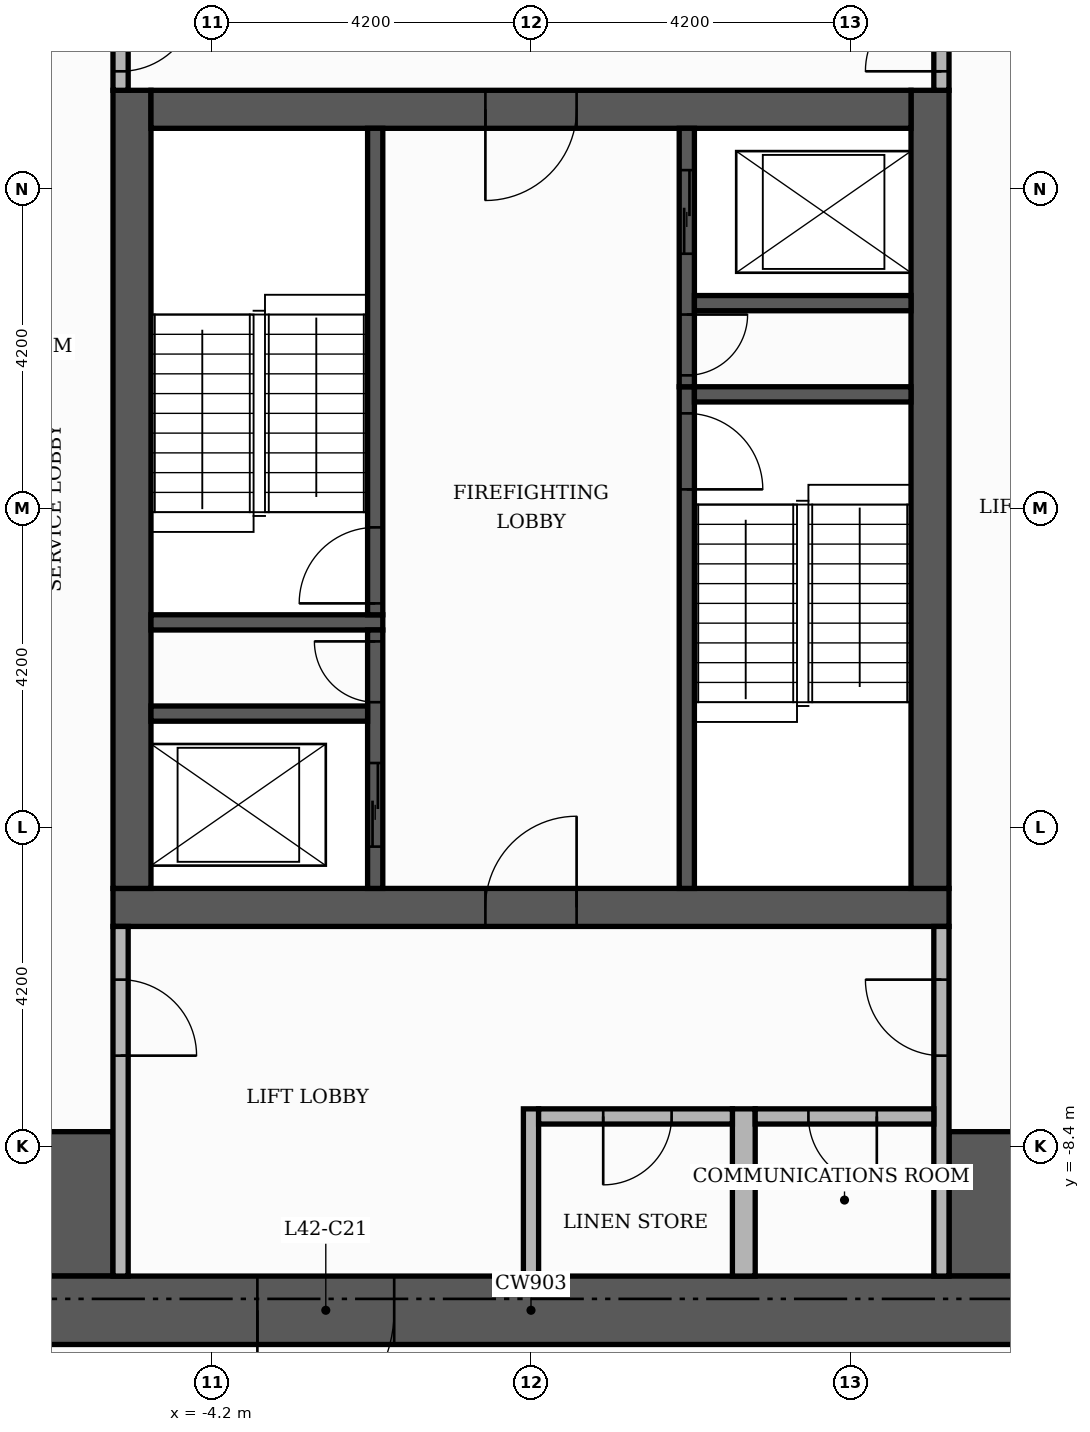
"""IFC4 building model, lengths in metres.
Left out: names, types, materials, properties, quantities, classifications, styles, units other than length and angle.
Written with IfcOpenShell. Run it as: python <this file> out.ifc"""

import sys

from ifc_helpers import new_model, si_unit, direction, frame, frame_2d, origin, place, context, subcontext, project, spatial, rectangle, extrude, element, fill, save


model = new_model("IFC4")
c1 = context("Model", 3, precision=1e-05, world=origin(), true_north=direction((0.0, 1.0)))
c2 = subcontext(c1, "Body", "Model", "MODEL_VIEW")
j1 = project(units=[si_unit("LENGTHUNIT", "METRE"), si_unit("PLANEANGLEUNIT", "RADIAN")], contexts=[c1])
p1 = place(None, origin())
s1 = spatial("IfcSite", under=j1, at=p1, CompositionType="ELEMENT")
p2 = place(p1, origin())
s2 = spatial("IfcBuilding", under=s1, at=p2, CompositionType="ELEMENT")
p3 = place(p2, frame((0.0, 0.0, 176.7)))
s3 = spatial("IfcBuildingStorey", under=s2, at=p3, CompositionType="ELEMENT", Elevation=176.7)
p4 = place(p3, frame((-5.5, -5.25, 0.0), z_axis=(0.0, 0.0, 1.0), x_axis=(1.0, 0.0, 0.0)))
e1 = element("IfcWall", 1, at=p4, inside=s3, PredefinedType="SHEAR", context=c2, shape_type="SweptSolid", body=[
    extrude(rectangle(XDim=11.0, YDim=0.5, at=frame_2d((5.5, 0.0))), origin(), (0.0, 0.0, 1.0), 3.4),
])
p5 = place(p4, frame((4.9, 0.0, 0.0)))
e2 = element("IfcOpeningElement", 2, at=p5, cuts=e1, PredefinedType="OPENING", context=c2, shape_type="SweptSolid", body=[
    extrude(rectangle(XDim=1.2, YDim=2.1, at=frame_2d((0.6, 1.05))), frame((0.0, 0.26, 0.0), z_axis=(0.0, -1.0, 0.0), x_axis=(1.0, 0.0, 0.0)), (0.0, 0.0, 1.0), 0.52),
])
for number, where, z_axis, x_axis in (
    (3, (-5.25, -5.0, 0.0), (0.0, 0.0, 1.0), (0.0, 1.0, 0.0)),
    (4, (5.25, -5.0, 0.0), (0.0, 0.0, 1.0), (0.0, 1.0, 0.0)),
):
    element("IfcWall", number, at=place(p3, frame(where, z_axis=z_axis, x_axis=x_axis)), inside=s3, PredefinedType="SHEAR", context=c2, shape_type="SweptSolid", body=[
        extrude(rectangle(XDim=10.5, YDim=0.5, at=frame_2d((5.25, 0.0))), origin(), (0.0, 0.0, 1.0), 3.4),
    ])
p6 = place(p3, frame((-5.0, 5.25, 0.0), z_axis=(0.0, 0.0, 1.0), x_axis=(1.0, 0.0, 0.0)))
e5 = element("IfcWall", 5, at=p6, inside=s3, PredefinedType="SHEAR", context=c2, shape_type="SweptSolid", body=[
    extrude(rectangle(XDim=10.0, YDim=0.5, at=frame_2d((5.0, 0.0))), origin(), (0.0, 0.0, 1.0), 3.4),
])
p7 = place(p6, frame((4.4, 0.0, 0.0)))
e6 = element("IfcOpeningElement", 6, at=p7, cuts=e5, PredefinedType="OPENING", context=c2, shape_type="SweptSolid", body=[
    extrude(rectangle(XDim=1.2, YDim=2.1, at=frame_2d((0.6, 1.05))), frame((0.0, 0.26, 0.0), z_axis=(0.0, -1.0, 0.0), x_axis=(1.0, 0.0, 0.0)), (0.0, 0.0, 1.0), 0.52),
])
for number, where, z_axis, x_axis in (
    (7, (-10.1, -9.15, 0.0), (0.0, 0.0, 1.0), (1.0, 0.0, 0.0)),
    (8, (5.5, -9.15, 0.0), (0.0, 0.0, 1.0), (1.0, 0.0, 0.0)),
):
    element("IfcWall", number, at=place(p3, frame(where, z_axis=z_axis, x_axis=x_axis)), inside=s3, PredefinedType="SHEAR", context=c2, shape_type="SweptSolid", body=[
        extrude(rectangle(XDim=4.6, YDim=1.9, at=frame_2d((2.3, 0.0))), origin(), (0.0, 0.0, 1.0), 3.4),
    ])
p8 = place(p3, frame((2.05, -5.0, 0.0), z_axis=(0.0, 0.0, 1.0), x_axis=(0.0, 1.0, 0.0)))
e9 = element("IfcWall", 9, at=p8, inside=s3, PredefinedType="SHEAR", context=c2, shape_type="SweptSolid", body=[
    extrude(rectangle(XDim=6.6, YDim=0.2, at=frame_2d((3.3, 0.0))), origin(), (0.0, 0.0, 1.0), 3.4),
])
p9 = place(p8, frame((5.25, 0.0, 0.0)))
e10 = element("IfcOpeningElement", 10, at=p9, cuts=e9, PredefinedType="OPENING", context=c2, shape_type="SweptSolid", body=[
    extrude(rectangle(XDim=1.0, YDim=2.1, at=frame_2d((0.5, 1.05))), frame((0.0, 0.11, 0.0), z_axis=(0.0, -1.0, 0.0), x_axis=(1.0, 0.0, 0.0)), (0.0, 0.0, 1.0), 0.22),
])
p10 = place(p3, frame((-5.0, -1.5, 0.0), z_axis=(0.0, 0.0, 1.0), x_axis=(1.0, 0.0, 0.0)))
e11 = element("IfcWall", 11, at=p10, inside=s3, PredefinedType="SHEAR", context=c2, shape_type="SweptSolid", body=[
    extrude(rectangle(XDim=3.05, YDim=0.2, at=frame_2d((1.525, 0.0))), origin(), (0.0, 0.0, 1.0), 3.4),
])
p11 = place(p3, frame((-2.05, -1.4, 0.0), z_axis=(0.0, 0.0, 1.0), x_axis=(0.0, 1.0, 0.0)))
e12 = element("IfcWall", 12, at=p11, inside=s3, PredefinedType="SHEAR", context=c2, shape_type="SweptSolid", body=[
    extrude(rectangle(XDim=6.4, YDim=0.2, at=frame_2d((3.2, 0.0))), origin(), (0.0, 0.0, 1.0), 3.4),
])
p12 = place(p11, frame((0.15, 0.0, 0.0)))
e13 = element("IfcOpeningElement", 13, at=p12, cuts=e12, PredefinedType="OPENING", context=c2, shape_type="SweptSolid", body=[
    extrude(rectangle(XDim=1.0, YDim=2.1, at=frame_2d((0.5, 1.05))), frame((0.0, 0.11, 0.0), z_axis=(0.0, -1.0, 0.0), x_axis=(1.0, 0.0, 0.0)), (0.0, 0.0, 1.0), 0.22),
])
p13 = place(p3, frame((2.15, 1.5, 0.0), z_axis=(0.0, 0.0, 1.0), x_axis=(1.0, 0.0, 0.0)))
e14 = element("IfcWall", 14, at=p13, inside=s3, PredefinedType="SHEAR", context=c2, shape_type="SweptSolid", body=[
    extrude(rectangle(XDim=2.85, YDim=0.2, at=frame_2d((1.425, 0.0))), origin(), (0.0, 0.0, 1.0), 3.4),
])
p14 = place(p3, frame((-2.05, -5.0, 0.0), z_axis=(0.0, 0.0, 1.0), x_axis=(0.0, 1.0, 0.0)))
e15 = element("IfcWall", 15, at=p14, inside=s3, PredefinedType="SHEAR", context=c2, shape_type="SweptSolid", body=[
    extrude(rectangle(XDim=3.4, YDim=0.2, at=frame_2d((1.7, 0.0))), origin(), (0.0, 0.0, 1.0), 3.4),
])
p15 = place(p14, frame((0.55, 0.0, 0.0)))
e16 = element("IfcOpeningElement", 16, at=p15, cuts=e15, PredefinedType="OPENING", context=c2, shape_type="SweptSolid", body=[
    extrude(rectangle(XDim=1.1, YDim=2.1, at=frame_2d((0.55, 1.05))), frame((0.0, 0.11, 0.0), z_axis=(0.0, -1.0, 0.0), x_axis=(1.0, 0.0, 0.0)), (0.0, 0.0, 1.0), 0.22),
])
p16 = place(p14, frame((2.45, 0.0, 0.0)))
e17 = element("IfcOpeningElement", 17, at=p16, cuts=e15, PredefinedType="OPENING", context=c2, shape_type="SweptSolid", body=[
    extrude(rectangle(XDim=0.8, YDim=2.1, at=frame_2d((0.4, 1.05))), frame((0.0, 0.11, 0.0), z_axis=(0.0, -1.0, 0.0), x_axis=(1.0, 0.0, 0.0)), (0.0, 0.0, 1.0), 0.22),
])
p17 = place(p3, frame((-5.0, -2.7, 0.0), z_axis=(0.0, 0.0, 1.0), x_axis=(1.0, 0.0, 0.0)))
e18 = element("IfcWall", 18, at=p17, inside=s3, PredefinedType="SHEAR", context=c2, shape_type="SweptSolid", body=[
    extrude(rectangle(XDim=2.85, YDim=0.2, at=frame_2d((1.425, 0.0))), origin(), (0.0, 0.0, 1.0), 3.4),
])
p18 = place(p3, frame((2.05, 1.6, 0.0), z_axis=(0.0, 0.0, 1.0), x_axis=(0.0, 1.0, 0.0)))
e19 = element("IfcWall", 19, at=p18, inside=s3, PredefinedType="SHEAR", context=c2, shape_type="SweptSolid", body=[
    extrude(rectangle(XDim=3.4, YDim=0.2, at=frame_2d((1.7, 0.0))), origin(), (0.0, 0.0, 1.0), 3.4),
])
p19 = place(p18, frame((1.75, 0.0, 0.0)))
e20 = element("IfcOpeningElement", 20, at=p19, cuts=e19, PredefinedType="OPENING", context=c2, shape_type="SweptSolid", body=[
    extrude(rectangle(XDim=1.1, YDim=2.1, at=frame_2d((0.55, 1.05))), frame((0.0, 0.11, 0.0), z_axis=(0.0, -1.0, 0.0), x_axis=(1.0, 0.0, 0.0)), (0.0, 0.0, 1.0), 0.22),
])
p20 = place(p18, frame((0.15, 0.0, 0.0)))
e21 = element("IfcOpeningElement", 21, at=p20, cuts=e19, PredefinedType="OPENING", context=c2, shape_type="SweptSolid", body=[
    extrude(rectangle(XDim=0.8, YDim=2.1, at=frame_2d((0.4, 1.05))), frame((0.0, 0.11, 0.0), z_axis=(0.0, -1.0, 0.0), x_axis=(1.0, 0.0, 0.0)), (0.0, 0.0, 1.0), 0.22),
])
p21 = place(p3, frame((2.15, 2.7, 0.0), z_axis=(0.0, 0.0, 1.0), x_axis=(1.0, 0.0, 0.0)))
e22 = element("IfcWall", 22, at=p21, inside=s3, PredefinedType="SHEAR", context=c2, shape_type="SweptSolid", body=[
    extrude(rectangle(XDim=2.85, YDim=0.2, at=frame_2d((1.425, 0.0))), origin(), (0.0, 0.0, 1.0), 3.4),
])
p22 = place(p3, frame((-11.0, -10.55, 0.0), z_axis=(0.0, 0.0, 1.0), x_axis=(1.0, 0.0, 0.0)))
e23 = element("IfcWall", 23, at=p22, inside=s3, PredefinedType="SHEAR", context=c2, shape_type="SweptSolid", body=[
    extrude(rectangle(XDim=22.0, YDim=0.9, at=frame_2d((11.0, 0.0))), origin(), (0.0, 0.0, 1.0), 3.4),
])
p23 = place(p22, frame((7.4, 0.0, 0.0)))
e24 = element("IfcOpeningElement", 24, at=p23, cuts=e23, PredefinedType="OPENING", context=c2, shape_type="SweptSolid", body=[
    extrude(rectangle(XDim=1.8, YDim=2.2, at=frame_2d((0.9, 1.1))), frame((0.0, 0.46, 0.0), z_axis=(0.0, -1.0, 0.0), x_axis=(1.0, 0.0, 0.0)), (0.0, 0.0, 1.0), 0.92),
])
p24 = place(p3, frame((-5.4, -10.1, 0.0), z_axis=(0.0, 0.0, 1.0), x_axis=(0.0, 1.0, 0.0)))
e25 = element("IfcWall", 25, at=p24, inside=s3, PredefinedType="PARTITIONING", context=c2, shape_type="SweptSolid", body=[
    extrude(rectangle(XDim=4.6, YDim=0.2, at=frame_2d((2.3, 0.0))), origin(), (0.0, 0.0, 1.0), 3.4),
])
p25 = place(p24, frame((2.9, 0.0, 0.0)))
e26 = element("IfcOpeningElement", 26, at=p25, cuts=e25, PredefinedType="OPENING", context=c2, shape_type="SweptSolid", body=[
    extrude(rectangle(XDim=1.0, YDim=2.1, at=frame_2d((0.5, 1.05))), frame((0.0, 0.11, 0.0), z_axis=(0.0, -1.0, 0.0), x_axis=(1.0, 0.0, 0.0)), (0.0, 0.0, 1.0), 0.22),
])
p26 = place(p3, frame((0.0, -10.1, 0.0), z_axis=(0.0, 0.0, 1.0), x_axis=(0.0, 1.0, 0.0)))
e27 = element("IfcWall", 27, at=p26, inside=s3, PredefinedType="PARTITIONING", context=c2, shape_type="SweptSolid", body=[
    extrude(rectangle(XDim=2.2, YDim=0.2, at=frame_2d((1.1, 0.0))), origin(), (0.0, 0.0, 1.0), 3.4),
])
p27 = place(p3, frame((2.8, -10.1, 0.0), z_axis=(0.0, 0.0, 1.0), x_axis=(0.0, 1.0, 0.0)))
e28 = element("IfcWall", 28, at=p27, inside=s3, PredefinedType="PARTITIONING", context=c2, shape_type="SweptSolid", body=[
    extrude(rectangle(XDim=2.2, YDim=0.3, at=frame_2d((1.1, 0.0))), origin(), (0.0, 0.0, 1.0), 3.4),
])
p28 = place(p3, frame((5.4, -10.1, 0.0), z_axis=(0.0, 0.0, 1.0), x_axis=(0.0, 1.0, 0.0)))
e29 = element("IfcWall", 29, at=p28, inside=s3, PredefinedType="PARTITIONING", context=c2, shape_type="SweptSolid", body=[
    extrude(rectangle(XDim=4.6, YDim=0.2, at=frame_2d((2.3, 0.0))), origin(), (0.0, 0.0, 1.0), 3.4),
])
p29 = place(p28, frame((2.9, 0.0, 0.0)))
e30 = element("IfcOpeningElement", 30, at=p29, cuts=e29, PredefinedType="OPENING", context=c2, shape_type="SweptSolid", body=[
    extrude(rectangle(XDim=1.0, YDim=2.1, at=frame_2d((0.5, 1.05))), frame((0.0, 0.11, 0.0), z_axis=(0.0, -1.0, 0.0), x_axis=(1.0, 0.0, 0.0)), (0.0, 0.0, 1.0), 0.22),
])
p30 = place(p3, frame((0.1, -8.0, 0.0), z_axis=(0.0, 0.0, 1.0), x_axis=(1.0, 0.0, 0.0)))
e31 = element("IfcWall", 31, at=p30, inside=s3, PredefinedType="PARTITIONING", context=c2, shape_type="SweptSolid", body=[
    extrude(rectangle(XDim=2.55, YDim=0.2, at=frame_2d((1.275, 0.0))), origin(), (0.0, 0.0, 1.0), 3.4),
])
p31 = place(p30, frame((0.85, 0.0, 0.0)))
e32 = element("IfcOpeningElement", 32, at=p31, cuts=e31, PredefinedType="OPENING", context=c2, shape_type="SweptSolid", body=[
    extrude(rectangle(XDim=0.9, YDim=2.1, at=frame_2d((0.45, 1.05))), frame((0.0, 0.11, 0.0), z_axis=(0.0, -1.0, 0.0), x_axis=(1.0, 0.0, 0.0)), (0.0, 0.0, 1.0), 0.22),
])
p32 = place(p3, frame((2.95, -8.0, 0.0), z_axis=(0.0, 0.0, 1.0), x_axis=(1.0, 0.0, 0.0)))
e33 = element("IfcWall", 33, at=p32, inside=s3, PredefinedType="PARTITIONING", context=c2, shape_type="SweptSolid", body=[
    extrude(rectangle(XDim=2.35, YDim=0.2, at=frame_2d((1.175, 0.0))), origin(), (0.0, 0.0, 1.0), 3.4),
])
p33 = place(p32, frame((0.7, 0.0, 0.0)))
e34 = element("IfcOpeningElement", 34, at=p33, cuts=e33, PredefinedType="OPENING", context=c2, shape_type="SweptSolid", body=[
    extrude(rectangle(XDim=0.9, YDim=2.1, at=frame_2d((0.45, 1.05))), frame((0.0, 0.11, 0.0), z_axis=(0.0, -1.0, 0.0), x_axis=(1.0, 0.0, 0.0)), (0.0, 0.0, 1.0), 0.22),
])
p34 = place(p3, frame((-5.4, 5.5, 0.0), z_axis=(0.0, 0.0, 1.0), x_axis=(0.0, 1.0, 0.0)))
e35 = element("IfcWall", 35, at=p34, inside=s3, PredefinedType="PARTITIONING", context=c2, shape_type="SweptSolid", body=[
    extrude(rectangle(XDim=1.55, YDim=0.2, at=frame_2d((0.775, 0.0))), origin(), (0.0, 0.0, 1.0), 3.4),
])
p35 = place(p34, frame((0.25, 0.0, 0.0)))
e36 = element("IfcOpeningElement", 36, at=p35, cuts=e35, PredefinedType="OPENING", context=c2, shape_type="SweptSolid", body=[
    extrude(rectangle(XDim=1.0, YDim=2.1, at=frame_2d((0.5, 1.05))), frame((0.0, 0.11, 0.0), z_axis=(0.0, -1.0, 0.0), x_axis=(1.0, 0.0, 0.0)), (0.0, 0.0, 1.0), 0.22),
])
p36 = place(p3, frame((5.4, 5.5, 0.0), z_axis=(0.0, 0.0, 1.0), x_axis=(0.0, 1.0, 0.0)))
e37 = element("IfcWall", 37, at=p36, inside=s3, PredefinedType="PARTITIONING", context=c2, shape_type="SweptSolid", body=[
    extrude(rectangle(XDim=4.6, YDim=0.2, at=frame_2d((2.3, 0.0))), origin(), (0.0, 0.0, 1.0), 3.4),
])
p37 = place(p36, frame((0.25, 0.0, 0.0)))
e38 = element("IfcOpeningElement", 38, at=p37, cuts=e37, PredefinedType="OPENING", context=c2, shape_type="SweptSolid", body=[
    extrude(rectangle(XDim=1.0, YDim=2.1, at=frame_2d((0.5, 1.05))), frame((0.0, 0.11, 0.0), z_axis=(0.0, -1.0, 0.0), x_axis=(1.0, 0.0, 0.0)), (0.0, 0.0, 1.0), 0.22),
])
p38 = place(p19, origin())
e39 = element("IfcDoor", 39, at=p38, inside=s3, OperationType="SLIDING_TO_LEFT", PredefinedType="DOOR", context=c2, shape_type="SweptSolid", body=[
    extrude(rectangle(XDim=1.1, YDim=2.1, at=frame_2d((0.55, 1.05))), frame((0.0, 0.025, 0.0), z_axis=(0.0, -1.0, 0.0), x_axis=(1.0, 0.0, 0.0)), (0.0, 0.0, 1.0), 0.05),
])
fill(e20, e39)
p39 = place(p15, origin())
e40 = element("IfcDoor", 40, at=p39, inside=s3, OperationType="SLIDING_TO_LEFT", PredefinedType="DOOR", context=c2, shape_type="SweptSolid", body=[
    extrude(rectangle(XDim=1.1, YDim=2.1, at=frame_2d((0.55, 1.05))), frame((0.0, 0.025, 0.0), z_axis=(0.0, -1.0, 0.0), x_axis=(1.0, 0.0, 0.0)), (0.0, 0.0, 1.0), 0.05),
])
fill(e16, e40)
p40 = place(p12, origin())
e41 = element("IfcDoor", 41, at=p40, inside=s3, OperationType="SINGLE_SWING_LEFT", PredefinedType="DOOR", context=c2, shape_type="SweptSolid", body=[
    extrude(rectangle(XDim=1.0, YDim=2.1, at=frame_2d((0.5, 1.05))), frame((0.0, 0.025, 0.0), z_axis=(0.0, -1.0, 0.0), x_axis=(1.0, 0.0, 0.0)), (0.0, 0.0, 1.0), 0.05),
])
fill(e13, e41)
p41 = place(p9, frame((1.0, 0.0, 0.0), z_axis=(0.0, 0.0, 1.0), x_axis=(-1.0, 0.0, 0.0)))
e42 = element("IfcDoor", 42, at=p41, inside=s3, OperationType="SINGLE_SWING_LEFT", PredefinedType="DOOR", context=c2, shape_type="SweptSolid", body=[
    extrude(rectangle(XDim=1.0, YDim=2.1, at=frame_2d((0.5, 1.05))), frame((0.0, 0.025, 0.0), z_axis=(0.0, -1.0, 0.0), x_axis=(1.0, 0.0, 0.0)), (0.0, 0.0, 1.0), 0.05),
])
fill(e10, e42)
p42 = place(p20, frame((0.8, 0.0, 0.0), z_axis=(0.0, 0.0, 1.0), x_axis=(-1.0, 0.0, 0.0)))
e43 = element("IfcDoor", 43, at=p42, inside=s3, OperationType="SINGLE_SWING_RIGHT", PredefinedType="DOOR", context=c2, shape_type="SweptSolid", body=[
    extrude(rectangle(XDim=0.8, YDim=2.1, at=frame_2d((0.4, 1.05))), frame((0.0, 0.025, 0.0), z_axis=(0.0, -1.0, 0.0), x_axis=(1.0, 0.0, 0.0)), (0.0, 0.0, 1.0), 0.05),
])
fill(e21, e43)
p43 = place(p16, origin())
e44 = element("IfcDoor", 44, at=p43, inside=s3, OperationType="SINGLE_SWING_RIGHT", PredefinedType="DOOR", context=c2, shape_type="SweptSolid", body=[
    extrude(rectangle(XDim=0.8, YDim=2.1, at=frame_2d((0.4, 1.05))), frame((0.0, 0.025, 0.0), z_axis=(0.0, -1.0, 0.0), x_axis=(1.0, 0.0, 0.0)), (0.0, 0.0, 1.0), 0.05),
])
fill(e17, e44)
p44 = place(p7, frame((1.2, 0.0, 0.0), z_axis=(0.0, 0.0, 1.0), x_axis=(-1.0, 0.0, 0.0)))
e45 = element("IfcDoor", 45, at=p44, inside=s3, OperationType="SINGLE_SWING_LEFT", PredefinedType="DOOR", context=c2, shape_type="SweptSolid", body=[
    extrude(rectangle(XDim=1.2, YDim=2.1, at=frame_2d((0.6, 1.05))), frame((0.0, 0.025, 0.0), z_axis=(0.0, -1.0, 0.0), x_axis=(1.0, 0.0, 0.0)), (0.0, 0.0, 1.0), 0.05),
])
fill(e6, e45)
p45 = place(p5, origin())
e46 = element("IfcDoor", 46, at=p45, inside=s3, OperationType="SINGLE_SWING_RIGHT", PredefinedType="DOOR", context=c2, shape_type="SweptSolid", body=[
    extrude(rectangle(XDim=1.2, YDim=2.1, at=frame_2d((0.6, 1.05))), frame((0.0, 0.025, 0.0), z_axis=(0.0, -1.0, 0.0), x_axis=(1.0, 0.0, 0.0)), (0.0, 0.0, 1.0), 0.05),
])
fill(e2, e46)
p46 = place(p35, frame((1.0, 0.0, 0.0), z_axis=(0.0, 0.0, 1.0), x_axis=(-1.0, 0.0, 0.0)))
e47 = element("IfcDoor", 47, at=p46, inside=s3, OperationType="SINGLE_SWING_RIGHT", PredefinedType="DOOR", context=c2, shape_type="SweptSolid", body=[
    extrude(rectangle(XDim=1.0, YDim=2.1, at=frame_2d((0.5, 1.05))), frame((0.0, 0.025, 0.0), z_axis=(0.0, -1.0, 0.0), x_axis=(1.0, 0.0, 0.0)), (0.0, 0.0, 1.0), 0.05),
])
fill(e36, e47)
p47 = place(p37, origin())
e48 = element("IfcDoor", 48, at=p47, inside=s3, OperationType="SINGLE_SWING_LEFT", PredefinedType="DOOR", context=c2, shape_type="SweptSolid", body=[
    extrude(rectangle(XDim=1.0, YDim=2.1, at=frame_2d((0.5, 1.05))), frame((0.0, 0.025, 0.0), z_axis=(0.0, -1.0, 0.0), x_axis=(1.0, 0.0, 0.0)), (0.0, 0.0, 1.0), 0.05),
])
fill(e38, e48)
p48 = place(p25, frame((1.0, 0.0, 0.0), z_axis=(0.0, 0.0, 1.0), x_axis=(-1.0, 0.0, 0.0)))
e49 = element("IfcDoor", 49, at=p48, inside=s3, OperationType="SINGLE_SWING_LEFT", PredefinedType="DOOR", context=c2, shape_type="SweptSolid", body=[
    extrude(rectangle(XDim=1.0, YDim=2.1, at=frame_2d((0.5, 1.05))), frame((0.0, 0.025, 0.0), z_axis=(0.0, -1.0, 0.0), x_axis=(1.0, 0.0, 0.0)), (0.0, 0.0, 1.0), 0.05),
])
fill(e26, e49)
p49 = place(p29, origin())
e50 = element("IfcDoor", 50, at=p49, inside=s3, OperationType="SINGLE_SWING_RIGHT", PredefinedType="DOOR", context=c2, shape_type="SweptSolid", body=[
    extrude(rectangle(XDim=1.0, YDim=2.1, at=frame_2d((0.5, 1.05))), frame((0.0, 0.025, 0.0), z_axis=(0.0, -1.0, 0.0), x_axis=(1.0, 0.0, 0.0)), (0.0, 0.0, 1.0), 0.05),
])
fill(e30, e50)
p50 = place(p23, frame((1.8, 0.0, 0.0), z_axis=(0.0, 0.0, 1.0), x_axis=(-1.0, 0.0, 0.0)))
e51 = element("IfcDoor", 51, at=p50, inside=s3, OperationType="DOUBLE_DOOR_SINGLE_SWING", PredefinedType="DOOR", context=c2, shape_type="SweptSolid", body=[
    extrude(rectangle(XDim=1.8, YDim=2.2, at=frame_2d((0.9, 1.1))), frame((0.0, 0.025, 0.0), z_axis=(0.0, -1.0, 0.0), x_axis=(1.0, 0.0, 0.0)), (0.0, 0.0, 1.0), 0.05),
])
fill(e24, e51)
p51 = place(p31, frame((0.9, 0.0, 0.0), z_axis=(0.0, 0.0, 1.0), x_axis=(-1.0, 0.0, 0.0)))
e52 = element("IfcDoor", 52, at=p51, inside=s3, OperationType="SINGLE_SWING_LEFT", PredefinedType="DOOR", context=c2, shape_type="SweptSolid", body=[
    extrude(rectangle(XDim=0.9, YDim=2.1, at=frame_2d((0.45, 1.05))), frame((0.0, 0.025, 0.0), z_axis=(0.0, -1.0, 0.0), x_axis=(1.0, 0.0, 0.0)), (0.0, 0.0, 1.0), 0.05),
])
fill(e32, e52)
p52 = place(p33, frame((0.9, 0.0, 0.0), z_axis=(0.0, 0.0, 1.0), x_axis=(-1.0, 0.0, 0.0)))
e53 = element("IfcDoor", 53, at=p52, inside=s3, OperationType="SINGLE_SWING_RIGHT", PredefinedType="DOOR", context=c2, shape_type="SweptSolid", body=[
    extrude(rectangle(XDim=0.9, YDim=2.1, at=frame_2d((0.45, 1.05))), frame((0.0, 0.025, 0.0), z_axis=(0.0, -1.0, 0.0), x_axis=(1.0, 0.0, 0.0)), (0.0, 0.0, 1.0), 0.05),
])
fill(e34, e53)
save(model, sys.argv[1])
